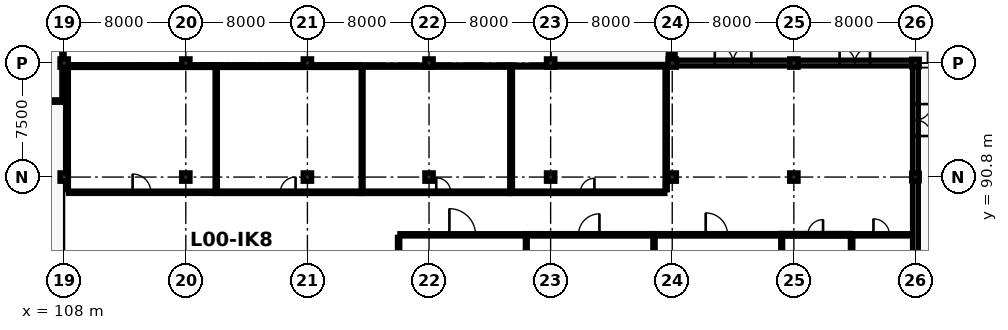
"""IFC4 building model, lengths in metres.
Left out: names, types, materials, properties, quantities, classifications, styles, units other than length and angle.
Written with IfcOpenShell. Run it as: python <this file> out.ifc"""

import sys

from ifc_helpers import new_model, si_unit, direction, frame, frame_2d, origin, origin_2d, place, context, subcontext, project, spatial, rectangle, extrude, element, fill, save


model = new_model("IFC4")
c1 = context("Model", 3, precision=1e-05, world=origin(), true_north=direction((0.0, 1.0)))
c2 = subcontext(c1, "Body", "Model", "MODEL_VIEW")
j1 = project(units=[si_unit("LENGTHUNIT", "METRE"), si_unit("PLANEANGLEUNIT", "RADIAN")], contexts=[c1])
p1 = place(None, origin())
s1 = spatial("IfcSite", under=j1, at=p1, CompositionType="ELEMENT")
p2 = place(p1, origin())
s2 = spatial("IfcBuilding", under=s1, at=p2, CompositionType="ELEMENT")
p3 = place(p2, origin())
s3 = spatial("IfcBuildingStorey", under=s2, at=p3, CompositionType="ELEMENT", Elevation=0.0)
for number, where, z_axis, x_axis in (
    (1, (108.0, 90.8, 0.0), (0.0, 0.0, 1.0), (1.0, 0.0, 0.0)),
    (2, (108.0, 98.3, 0.0), (0.0, 0.0, 1.0), (1.0, 0.0, 0.0)),
    (3, (116.0, 90.8, 0.0), (0.0, 0.0, 1.0), (1.0, 0.0, 0.0)),
    (4, (116.0, 98.3, 0.0), (0.0, 0.0, 1.0), (1.0, 0.0, 0.0)),
    (5, (124.0, 90.8, 0.0), (0.0, 0.0, 1.0), (1.0, 0.0, 0.0)),
    (6, (124.0, 98.3, 0.0), (0.0, 0.0, 1.0), (1.0, 0.0, 0.0)),
    (7, (132.0, 90.8, 0.0), (0.0, 0.0, 1.0), (1.0, 0.0, 0.0)),
    (8, (132.0, 98.3, 0.0), (0.0, 0.0, 1.0), (1.0, 0.0, 0.0)),
    (9, (140.0, 90.8, 0.0), (0.0, 0.0, 1.0), (1.0, 0.0, 0.0)),
    (10, (140.0, 98.3, 0.0), (0.0, 0.0, 1.0), (1.0, 0.0, 0.0)),
    (11, (148.0, 90.8, 0.0), (0.0, 0.0, 1.0), (1.0, 0.0, 0.0)),
    (12, (148.0, 98.3, 0.0), (0.0, 0.0, 1.0), (1.0, 0.0, 0.0)),
    (13, (156.0, 90.8, 0.0), (0.0, 0.0, 1.0), (1.0, 0.0, 0.0)),
    (14, (156.0, 98.3, 0.0), (0.0, 0.0, 1.0), (1.0, 0.0, 0.0)),
):
    element("IfcColumn", number, at=place(p3, frame(where, z_axis=z_axis, x_axis=x_axis)), inside=s3, PredefinedType="COLUMN", context=c2, shape_type="SweptSolid", body=[
        extrude(rectangle(XDim=0.55, YDim=0.55, at=origin_2d()), origin(), (0.0, 0.0, 1.0), 4.7),
    ])
for number, where, z_axis, x_axis in (
    (15, (164.0, 90.8, 0.0), (0.0, 0.0, 1.0), (1.0, 0.0, 0.0)),
    (16, (164.0, 98.3, 0.0), (0.0, 0.0, 1.0), (1.0, 0.0, 0.0)),
):
    element("IfcColumn", number, at=place(p3, frame(where, z_axis=z_axis, x_axis=x_axis)), inside=s3, PredefinedType="COLUMN", context=c2, shape_type="SweptSolid", body=[
        extrude(rectangle(XDim=0.5, YDim=0.5, at=origin_2d()), origin(), (0.0, 0.0, 1.0), 6.226),
    ])
p4 = place(p3, frame((148.0, 105.55, 0.0), z_axis=(0.0, 0.0, 1.0), x_axis=(0.0, -1.0, 0.0)))
e17 = element("IfcWall", 17, at=p4, inside=s3, PredefinedType="SOLIDWALL", context=c2, shape_type="SweptSolid", body=[
    extrude(rectangle(XDim=6.975, YDim=0.38, at=frame_2d((3.488, 0.0))), origin(), (0.0, 0.0, 1.0), 3.985),
])
p5 = place(p4, frame((0.587, 0.0, 0.0)))
e18 = element("IfcOpeningElement", 18, at=p5, cuts=e17, PredefinedType="OPENING", context=c2, shape_type="SweptSolid", body=[
    extrude(rectangle(XDim=5.8, YDim=3.0, at=frame_2d((2.9, 1.5))), frame((0.0, 0.202, 0.0), z_axis=(0.0, -1.0, 0.0), x_axis=(1.0, 0.0, 0.0)), (0.0, 0.0, 1.0), 0.404),
])
p6 = place(p3, frame((148.275, 98.3, 0.0), z_axis=(0.0, 0.0, 1.0), x_axis=(1.0, 0.0, 0.0)))
e19 = element("IfcWall", 19, at=p6, inside=s3, PredefinedType="SOLIDWALL", context=c2, shape_type="SweptSolid", body=[
    extrude(rectangle(XDim=7.45, YDim=0.38, at=frame_2d((3.725, 0.0))), origin(), (0.0, 0.0, 1.0), 3.985),
])
p7 = place(p6, frame((2.525, 0.0, 0.0)))
e20 = element("IfcOpeningElement", 20, at=p7, cuts=e19, PredefinedType="OPENING", context=c2, shape_type="SweptSolid", body=[
    extrude(rectangle(XDim=2.4, YDim=2.55, at=frame_2d((1.2, 1.275))), frame((0.0, 0.202, 0.0), z_axis=(0.0, -1.0, 0.0), x_axis=(1.0, 0.0, 0.0)), (0.0, 0.0, 1.0), 0.404),
])
p8 = place(p3, frame((156.275, 98.3, 0.0), z_axis=(0.0, 0.0, 1.0), x_axis=(1.0, 0.0, 0.0)))
e21 = element("IfcWall", 21, at=p8, inside=s3, PredefinedType="SOLIDWALL", context=c2, shape_type="SweptSolid", body=[
    extrude(rectangle(XDim=7.475, YDim=0.38, at=frame_2d((3.738, 0.0))), origin(), (0.0, 0.0, 1.0), 3.985),
])
p9 = place(p8, frame((2.738, 0.0, 0.0)))
e22 = element("IfcOpeningElement", 22, at=p9, cuts=e21, PredefinedType="OPENING", context=c2, shape_type="SweptSolid", body=[
    extrude(rectangle(XDim=2.0, YDim=2.35, at=frame_2d((1.0, 1.175))), frame((0.0, 0.202, 0.0), z_axis=(0.0, -1.0, 0.0), x_axis=(1.0, 0.0, 0.0)), (0.0, 0.0, 1.0), 0.404),
])
p10 = place(p3, frame((164.0, 98.05, 0.0), z_axis=(0.0, 0.0, 1.0), x_axis=(0.0, -1.0, 0.0)))
e23 = element("IfcWall", 23, at=p10, inside=s3, PredefinedType="SOLIDWALL", context=c2, shape_type="SweptSolid", body=[
    extrude(rectangle(XDim=7.0, YDim=0.38, at=frame_2d((3.5, 0.0))), origin(), (0.0, 0.0, 1.0), 4.67),
])
p11 = place(p10, frame((2.45, 0.0, 0.0)))
e24 = element("IfcOpeningElement", 24, at=p11, cuts=e23, PredefinedType="OPENING", context=c2, shape_type="SweptSolid", body=[
    extrude(rectangle(XDim=2.1, YDim=2.4, at=frame_2d((1.05, 1.2))), frame((0.0, 0.202, 0.0), z_axis=(0.0, -1.0, 0.0), x_axis=(1.0, 0.0, 0.0)), (0.0, 0.0, 1.0), 0.404),
])
p12 = place(p3, frame((164.0, 90.55, 0.0), z_axis=(0.0, 0.0, 1.0), x_axis=(0.0, -1.0, 0.0)))
e25 = element("IfcWall", 25, at=p12, inside=s3, PredefinedType="SOLIDWALL", context=c2, shape_type="SweptSolid", body=[
    extrude(rectangle(XDim=7.0, YDim=0.38, at=frame_2d((3.5, 0.0))), origin(), (0.0, 0.0, 1.0), 4.67),
])
p13 = place(p3, frame((147.87, 98.5, 4.9), z_axis=(0.0, 0.0, 1.0), x_axis=(0.0, 1.0, 0.0)))
e26 = element("IfcWall", 26, at=p13, inside=s3, PredefinedType="PARAPET", context=c2, shape_type="SweptSolid", body=[
    extrude(rectangle(XDim=7.3, YDim=0.26, at=frame_2d((3.65, 0.0))), origin(), (0.0, 0.0, 1.0), 1.15),
])
p14 = place(p3, frame((103.727, 95.8, 0.0), z_axis=(0.0, 0.0, 1.0), x_axis=(1.0, 0.0, 0.0)))
e27 = element("IfcWall", 27, at=p14, inside=s3, PredefinedType="PARTITIONING", context=c2, shape_type="SweptSolid", body=[
    extrude(rectangle(XDim=4.108, YDim=0.16, at=frame_2d((2.054, 0.0))), origin(), (0.0, 0.0, 1.0), 4.035),
])
p15 = place(p14, frame((1.334, 0.0, 0.0)))
e28 = element("IfcOpeningElement", 28, at=p15, cuts=e27, PredefinedType="OPENING", context=c2, shape_type="SweptSolid", body=[
    extrude(rectangle(XDim=1.44, YDim=2.32, at=frame_2d((0.72, 1.16))), frame((0.0, 0.092, 0.0), z_axis=(0.0, -1.0, 0.0), x_axis=(1.0, 0.0, 0.0)), (0.0, 0.0, 1.0), 0.184),
])
p16 = place(p3, frame((130.085, 87.0, 0.0), z_axis=(0.0, 0.0, 1.0), x_axis=(1.0, 0.0, 0.0)))
e29 = element("IfcWall", 29, at=p16, inside=s3, PredefinedType="PARTITIONING", context=c2, shape_type="SweptSolid", body=[
    extrude(rectangle(XDim=8.23, YDim=0.15, at=frame_2d((4.115, 0.0))), origin(), (0.0, 0.0, 1.0), 3.985),
])
p17 = place(p16, frame((3.255, 0.0, 0.0)))
e30 = element("IfcOpeningElement", 30, at=p17, cuts=e29, PredefinedType="OPENING", context=c2, shape_type="SweptSolid", body=[
    extrude(rectangle(XDim=1.72, YDim=2.34, at=frame_2d((0.86, 1.17))), frame((0.0, 0.087, 0.0), z_axis=(0.0, -1.0, 0.0), x_axis=(1.0, 0.0, 0.0)), (0.0, 0.0, 1.0), 0.174),
])
p18 = place(p3, frame((138.327, 87.0, 0.0), z_axis=(0.0, 0.0, 1.0), x_axis=(1.0, 0.0, 0.0)))
e31 = element("IfcWall", 31, at=p18, inside=s3, PredefinedType="PARTITIONING", context=c2, shape_type="SweptSolid", body=[
    extrude(rectangle(XDim=8.388, YDim=0.16, at=frame_2d((4.194, 0.0))), origin(), (0.0, 0.0, 1.0), 3.985),
])
p19 = place(p18, frame((3.504, 0.0, 0.0)))
e32 = element("IfcOpeningElement", 32, at=p19, cuts=e31, PredefinedType="OPENING", context=c2, shape_type="SweptSolid", body=[
    extrude(rectangle(XDim=1.38, YDim=2.3, at=frame_2d((0.69, 1.15))), frame((0.0, 0.092, 0.0), z_axis=(0.0, -1.0, 0.0), x_axis=(1.0, 0.0, 0.0)), (0.0, 0.0, 1.0), 0.184),
])
p20 = place(p3, frame((146.727, 87.0, 0.0), z_axis=(0.0, 0.0, 1.0), x_axis=(1.0, 0.0, 0.0)))
e33 = element("IfcWall", 33, at=p20, inside=s3, PredefinedType="PARTITIONING", context=c2, shape_type="SweptSolid", body=[
    extrude(rectangle(XDim=8.388, YDim=0.16, at=frame_2d((4.194, 0.0))), origin(), (0.0, 0.0, 1.0), 3.985),
])
p21 = place(p20, frame((3.474, 0.0, 0.0)))
e34 = element("IfcOpeningElement", 34, at=p21, cuts=e33, PredefinedType="OPENING", context=c2, shape_type="SweptSolid", body=[
    extrude(rectangle(XDim=1.44, YDim=2.32, at=frame_2d((0.72, 1.16))), frame((0.0, 0.092, 0.0), z_axis=(0.0, -1.0, 0.0), x_axis=(1.0, 0.0, 0.0)), (0.0, 0.0, 1.0), 0.184),
])
p22 = place(p3, frame((155.127, 87.0, 0.0), z_axis=(0.0, 0.0, 1.0), x_axis=(1.0, 0.0, 0.0)))
e35 = element("IfcWall", 35, at=p22, inside=s3, PredefinedType="PARTITIONING", context=c2, shape_type="SweptSolid", body=[
    extrude(rectangle(XDim=4.588, YDim=0.18, at=frame_2d((2.294, 0.0))), origin(), (0.0, 0.0, 1.0), 4.035),
])
p23 = place(p22, frame((1.794, 0.0, 0.0)))
e36 = element("IfcOpeningElement", 36, at=p23, cuts=e35, PredefinedType="OPENING", context=c2, shape_type="SweptSolid", body=[
    extrude(rectangle(XDim=1.0, YDim=2.15, at=frame_2d((0.5, 1.075))), frame((0.0, 0.102, 0.0), z_axis=(0.0, -1.0, 0.0), x_axis=(1.0, 0.0, 0.0)), (0.0, 0.0, 1.0), 0.204),
])
p24 = place(p3, frame((159.727, 87.0, 0.0), z_axis=(0.0, 0.0, 1.0), x_axis=(1.0, 0.0, 0.0)))
e37 = element("IfcWall", 37, at=p24, inside=s3, PredefinedType="PARTITIONING", context=c2, shape_type="SweptSolid", body=[
    extrude(rectangle(XDim=4.071, YDim=0.15, at=frame_2d((2.036, 0.0))), origin(), (0.0, 0.0, 1.0), 4.67),
])
p25 = place(p24, frame((1.51, 0.0, 0.0)))
e38 = element("IfcOpeningElement", 38, at=p25, cuts=e37, PredefinedType="OPENING", context=c2, shape_type="SweptSolid", body=[
    extrude(rectangle(XDim=1.05, YDim=2.15, at=frame_2d((0.525, 1.075))), frame((0.0, 0.087, 0.0), z_axis=(0.0, -1.0, 0.0), x_axis=(1.0, 0.0, 0.0)), (0.0, 0.0, 1.0), 0.174),
])
p26 = place(p3, frame((108.285, 89.8, 0.0), z_axis=(0.0, 0.0, 1.0), x_axis=(1.0, 0.0, 0.0)))
e39 = element("IfcWall", 39, at=p26, inside=s3, PredefinedType="PARTITIONING", context=c2, shape_type="SweptSolid", body=[
    extrude(rectangle(XDim=9.63, YDim=0.15, at=frame_2d((4.815, 0.0))), origin(), (0.0, 0.0, 1.0), 3.985),
])
p27 = place(p26, frame((4.215, 0.0, 0.0)))
e40 = element("IfcOpeningElement", 40, at=p27, cuts=e39, PredefinedType="OPENING", context=c2, shape_type="SweptSolid", body=[
    extrude(rectangle(XDim=1.2, YDim=2.15, at=frame_2d((0.6, 1.075))), frame((0.0, 0.087, 0.0), z_axis=(0.0, -1.0, 0.0), x_axis=(1.0, 0.0, 0.0)), (0.0, 0.0, 1.0), 0.174),
])
p28 = place(p3, frame((117.927, 89.8, 0.0), z_axis=(0.0, 0.0, 1.0), x_axis=(1.0, 0.0, 0.0)))
e41 = element("IfcWall", 41, at=p28, inside=s3, PredefinedType="PARTITIONING", context=c2, shape_type="SweptSolid", body=[
    extrude(rectangle(XDim=9.588, YDim=0.16, at=frame_2d((4.794, 0.0))), origin(), (0.0, 0.0, 1.0), 3.985),
])
p29 = place(p28, frame((4.294, 0.0, 0.0)))
e42 = element("IfcOpeningElement", 42, at=p29, cuts=e41, PredefinedType="OPENING", context=c2, shape_type="SweptSolid", body=[
    extrude(rectangle(XDim=1.0, YDim=2.22, at=frame_2d((0.5, 1.11))), frame((0.0, 0.092, 0.0), z_axis=(0.0, -1.0, 0.0), x_axis=(1.0, 0.0, 0.0)), (0.0, 0.0, 1.0), 0.184),
])
p30 = place(p3, frame((127.527, 89.8, 0.0), z_axis=(0.0, 0.0, 1.0), x_axis=(1.0, 0.0, 0.0)))
e43 = element("IfcWall", 43, at=p30, inside=s3, PredefinedType="PARTITIONING", context=c2, shape_type="SweptSolid", body=[
    extrude(rectangle(XDim=9.788, YDim=0.16, at=frame_2d((4.894, 0.0))), origin(), (0.0, 0.0, 1.0), 3.985),
])
p31 = place(p30, frame((4.949, 0.0, 0.0)))
e44 = element("IfcOpeningElement", 44, at=p31, cuts=e43, PredefinedType="OPENING", context=c2, shape_type="SweptSolid", body=[
    extrude(rectangle(XDim=0.95, YDim=2.15, at=frame_2d((0.475, 1.075))), frame((0.0, 0.092, 0.0), z_axis=(0.0, -1.0, 0.0), x_axis=(1.0, 0.0, 0.0)), (0.0, 0.0, 1.0), 0.184),
])
p32 = place(p3, frame((137.327, 89.8, 0.0), z_axis=(0.0, 0.0, 1.0), x_axis=(1.0, 0.0, 0.0)))
e45 = element("IfcWall", 45, at=p32, inside=s3, PredefinedType="PARTITIONING", context=c2, shape_type="SweptSolid", body=[
    extrude(rectangle(XDim=10.188, YDim=0.16, at=frame_2d((5.094, 0.0))), origin(), (0.0, 0.0, 1.0), 3.985),
])
p33 = place(p32, frame((4.634, 0.0, 0.0)))
e46 = element("IfcOpeningElement", 46, at=p33, cuts=e45, PredefinedType="OPENING", context=c2, shape_type="SweptSolid", body=[
    extrude(rectangle(XDim=0.92, YDim=2.1, at=frame_2d((0.46, 1.05))), frame((0.0, 0.092, 0.0), z_axis=(0.0, -1.0, 0.0), x_axis=(1.0, 0.0, 0.0)), (0.0, 0.0, 1.0), 0.184),
])
p34 = place(p3, frame((108.287, 98.1, 0.0), z_axis=(0.0, 0.0, 1.0), x_axis=(1.0, 0.0, 0.0)))
e47 = element("IfcWall", 47, at=p34, inside=s3, PredefinedType="PARTITIONING", context=c2, shape_type="SweptSolid", body=[
    extrude(rectangle(XDim=9.628, YDim=0.18, at=frame_2d((4.814, 0.0))), origin(), (0.0, 0.0, 1.0), 3.885),
])
p35 = place(p3, frame((117.927, 98.1, 0.0), z_axis=(0.0, 0.0, 1.0), x_axis=(1.0, 0.0, 0.0)))
e48 = element("IfcWall", 48, at=p35, inside=s3, PredefinedType="PARTITIONING", context=c2, shape_type="SweptSolid", body=[
    extrude(rectangle(XDim=9.588, YDim=0.18, at=frame_2d((4.794, 0.0))), origin(), (0.0, 0.0, 1.0), 3.885),
])
p36 = place(p3, frame((127.527, 98.1, 0.0), z_axis=(0.0, 0.0, 1.0), x_axis=(1.0, 0.0, 0.0)))
e49 = element("IfcWall", 49, at=p36, inside=s3, PredefinedType="PARTITIONING", context=c2, shape_type="SweptSolid", body=[
    extrude(rectangle(XDim=9.788, YDim=0.15, at=frame_2d((4.894, 0.0))), origin(), (0.0, 0.0, 1.0), 3.885),
])
p37 = place(p3, frame((137.327, 98.1, 0.0), z_axis=(0.0, 0.0, 1.0), x_axis=(1.0, 0.0, 0.0)))
e50 = element("IfcWall", 50, at=p37, inside=s3, PredefinedType="PARTITIONING", context=c2, shape_type="SweptSolid", body=[
    extrude(rectangle(XDim=10.386, YDim=0.125, at=frame_2d((5.193, 0.0))), origin(), (0.0, 0.0, 1.0), 3.885),
])
p38 = place(p3, frame((107.92, 95.965, 0.0), z_axis=(0.0, 0.0, 1.0), x_axis=(0.0, 1.0, 0.0)))
e51 = element("IfcWall", 51, at=p38, inside=s3, PredefinedType="PARTITIONING", context=c2, shape_type="SweptSolid", body=[
    extrude(rectangle(XDim=17.073, YDim=0.15, at=frame_2d((8.537, 0.0))), origin(), (0.0, 0.0, 1.0), 3.885),
])
p39 = place(p3, frame((130.0, 75.687, 0.0), z_axis=(0.0, 0.0, 1.0), x_axis=(0.0, 1.0, 0.0)))
e52 = element("IfcWall", 52, at=p39, inside=s3, PredefinedType="PARTITIONING", context=c2, shape_type="SweptSolid", body=[
    extrude(rectangle(XDim=11.148, YDim=0.15, at=frame_2d((5.574, 0.0))), origin(), (0.0, 0.0, 1.0), 3.885),
])
p40 = place(p3, frame((138.4, 76.102, 0.0), z_axis=(0.0, 0.0, 1.0), x_axis=(0.0, 1.0, 0.0)))
e53 = element("IfcWall", 53, at=p40, inside=s3, PredefinedType="PARTITIONING", context=c2, shape_type="SweptSolid", body=[
    extrude(rectangle(XDim=10.806, YDim=0.125, at=frame_2d((5.403, 0.0))), origin(), (0.0, 0.0, 1.0), 3.885),
])
p41 = place(p3, frame((146.8, 76.102, 0.0), z_axis=(0.0, 0.0, 1.0), x_axis=(0.0, 1.0, 0.0)))
e54 = element("IfcWall", 54, at=p41, inside=s3, PredefinedType="PARTITIONING", context=c2, shape_type="SweptSolid", body=[
    extrude(rectangle(XDim=10.806, YDim=0.15, at=frame_2d((5.403, 0.0))), origin(), (0.0, 0.0, 1.0), 3.885),
])
p42 = place(p3, frame((155.2, 75.902, 0.0), z_axis=(0.0, 0.0, 1.0), x_axis=(0.0, 1.0, 0.0)))
e55 = element("IfcWall", 55, at=p42, inside=s3, PredefinedType="PARTITIONING", context=c2, shape_type="SweptSolid", body=[
    extrude(rectangle(XDim=10.996, YDim=0.125, at=frame_2d((5.498, 0.0))), origin(), (0.0, 0.0, 1.0), 3.885),
])
p43 = place(p3, frame((159.8, 75.902, 0.0), z_axis=(0.0, 0.0, 1.0), x_axis=(0.0, 1.0, 0.0)))
e56 = element("IfcWall", 56, at=p43, inside=s3, PredefinedType="PARTITIONING", context=c2, shape_type="SweptSolid", body=[
    extrude(rectangle(XDim=11.011, YDim=0.16, at=frame_2d((5.505, 0.0))), origin(), (0.0, 0.0, 1.0), 4.616),
])
p44 = place(p3, frame((108.2, 89.965, 0.0), z_axis=(0.0, 0.0, 1.0), x_axis=(0.0, 1.0, 0.0)))
e57 = element("IfcWall", 57, at=p44, inside=s3, PredefinedType="PARTITIONING", context=c2, shape_type="SweptSolid", body=[
    extrude(rectangle(XDim=8.048, YDim=0.15, at=frame_2d((4.024, 0.0))), origin(), (0.0, 0.0, 1.0), 3.885),
])
p45 = place(p3, frame((118.0, 89.892, 0.0), z_axis=(0.0, 0.0, 1.0), x_axis=(0.0, 1.0, 0.0)))
e58 = element("IfcWall", 58, at=p45, inside=s3, PredefinedType="PARTITIONING", context=c2, shape_type="SweptSolid", body=[
    extrude(rectangle(XDim=8.106, YDim=0.15, at=frame_2d((4.053, 0.0))), origin(), (0.0, 0.0, 1.0), 3.885),
])
p46 = place(p3, frame((127.6, 89.892, 0.0), z_axis=(0.0, 0.0, 1.0), x_axis=(0.0, 1.0, 0.0)))
e59 = element("IfcWall", 59, at=p46, inside=s3, PredefinedType="PARTITIONING", context=c2, shape_type="SweptSolid", body=[
    extrude(rectangle(XDim=8.121, YDim=0.125, at=frame_2d((4.061, 0.0))), origin(), (0.0, 0.0, 1.0), 3.885),
])
p47 = place(p3, frame((137.4, 89.892, 0.0), z_axis=(0.0, 0.0, 1.0), x_axis=(0.0, 1.0, 0.0)))
e60 = element("IfcWall", 60, at=p47, inside=s3, PredefinedType="PARTITIONING", context=c2, shape_type="SweptSolid", body=[
    extrude(rectangle(XDim=8.133, YDim=0.18, at=frame_2d((4.067, 0.0))), origin(), (0.0, 0.0, 1.0), 3.885),
])
p48 = place(p3, frame((147.6, 89.965, 0.0), z_axis=(0.0, 0.0, 1.0), x_axis=(0.0, 1.0, 0.0)))
e61 = element("IfcWall", 61, at=p48, inside=s3, PredefinedType="PARTITIONING", context=c2, shape_type="SweptSolid", body=[
    extrude(rectangle(XDim=8.06, YDim=0.15, at=frame_2d((4.03, 0.0))), origin(), (0.0, 0.0, 1.0), 3.885),
])
p49 = place(p7, origin())
e62 = element("IfcDoor", 62, at=p49, inside=s3, OperationType="DOUBLE_DOOR_SINGLE_SWING", PredefinedType="DOOR", context=c2, shape_type="SweptSolid", body=[
    extrude(rectangle(XDim=2.4, YDim=2.55, at=frame_2d((1.2, 1.275))), frame((0.0, 0.025, 0.0), z_axis=(0.0, -1.0, 0.0), x_axis=(1.0, 0.0, 0.0)), (0.0, 0.0, 1.0), 0.05),
])
fill(e20, e62)
p50 = place(p9, origin())
e63 = element("IfcDoor", 63, at=p50, inside=s3, OperationType="DOUBLE_DOOR_SINGLE_SWING", PredefinedType="DOOR", context=c2, shape_type="SweptSolid", body=[
    extrude(rectangle(XDim=2.0, YDim=2.35, at=frame_2d((1.0, 1.175))), frame((0.0, 0.025, 0.0), z_axis=(0.0, -1.0, 0.0), x_axis=(1.0, 0.0, 0.0)), (0.0, 0.0, 1.0), 0.05),
])
fill(e22, e63)
p51 = place(p11, origin())
e64 = element("IfcDoor", 64, at=p51, inside=s3, OperationType="DOUBLE_DOOR_SINGLE_SWING", PredefinedType="DOOR", context=c2, shape_type="SweptSolid", body=[
    extrude(rectangle(XDim=2.1, YDim=2.4, at=frame_2d((1.05, 1.2))), frame((0.0, 0.025, 0.0), z_axis=(0.0, -1.0, 0.0), x_axis=(1.0, 0.0, 0.0)), (0.0, 0.0, 1.0), 0.05),
])
fill(e24, e64)
p52 = place(p17, origin())
e65 = element("IfcDoor", 65, at=p52, inside=s3, OperationType="SINGLE_SWING_LEFT", PredefinedType="DOOR", context=c2, shape_type="SweptSolid", body=[
    extrude(rectangle(XDim=1.72, YDim=2.34, at=frame_2d((0.86, 1.17))), frame((0.0, 0.025, 0.0), z_axis=(0.0, -1.0, 0.0), x_axis=(1.0, 0.0, 0.0)), (0.0, 0.0, 1.0), 0.05),
])
fill(e30, e65)
p53 = place(p19, origin())
e66 = element("IfcDoor", 66, at=p53, inside=s3, OperationType="SINGLE_SWING_RIGHT", PredefinedType="DOOR", context=c2, shape_type="SweptSolid", body=[
    extrude(rectangle(XDim=1.38, YDim=2.3, at=frame_2d((0.69, 1.15))), frame((0.0, 0.025, 0.0), z_axis=(0.0, -1.0, 0.0), x_axis=(1.0, 0.0, 0.0)), (0.0, 0.0, 1.0), 0.05),
])
fill(e32, e66)
p54 = place(p21, origin())
e67 = element("IfcDoor", 67, at=p54, inside=s3, OperationType="SINGLE_SWING_LEFT", PredefinedType="DOOR", context=c2, shape_type="SweptSolid", body=[
    extrude(rectangle(XDim=1.44, YDim=2.32, at=frame_2d((0.72, 1.16))), frame((0.0, 0.025, 0.0), z_axis=(0.0, -1.0, 0.0), x_axis=(1.0, 0.0, 0.0)), (0.0, 0.0, 1.0), 0.05),
])
fill(e34, e67)
p55 = place(p23, origin())
e68 = element("IfcDoor", 68, at=p55, inside=s3, OperationType="SINGLE_SWING_RIGHT", PredefinedType="DOOR", context=c2, shape_type="SweptSolid", body=[
    extrude(rectangle(XDim=1.0, YDim=2.15, at=frame_2d((0.5, 1.075))), frame((0.0, 0.025, 0.0), z_axis=(0.0, -1.0, 0.0), x_axis=(1.0, 0.0, 0.0)), (0.0, 0.0, 1.0), 0.05),
])
fill(e36, e68)
p56 = place(p25, origin())
e69 = element("IfcDoor", 69, at=p56, inside=s3, OperationType="SINGLE_SWING_LEFT", PredefinedType="DOOR", context=c2, shape_type="SweptSolid", body=[
    extrude(rectangle(XDim=1.05, YDim=2.15, at=frame_2d((0.525, 1.075))), frame((0.0, 0.025, 0.0), z_axis=(0.0, -1.0, 0.0), x_axis=(1.0, 0.0, 0.0)), (0.0, 0.0, 1.0), 0.05),
])
fill(e38, e69)
p57 = place(p27, origin())
e70 = element("IfcDoor", 70, at=p57, inside=s3, OperationType="SINGLE_SWING_LEFT", PredefinedType="DOOR", context=c2, shape_type="SweptSolid", body=[
    extrude(rectangle(XDim=1.2, YDim=2.15, at=frame_2d((0.6, 1.075))), frame((0.0, 0.025, 0.0), z_axis=(0.0, -1.0, 0.0), x_axis=(1.0, 0.0, 0.0)), (0.0, 0.0, 1.0), 0.05),
])
fill(e40, e70)
p58 = place(p29, origin())
e71 = element("IfcDoor", 71, at=p58, inside=s3, OperationType="SINGLE_SWING_RIGHT", PredefinedType="DOOR", context=c2, shape_type="SweptSolid", body=[
    extrude(rectangle(XDim=1.0, YDim=2.22, at=frame_2d((0.5, 1.11))), frame((0.0, 0.025, 0.0), z_axis=(0.0, -1.0, 0.0), x_axis=(1.0, 0.0, 0.0)), (0.0, 0.0, 1.0), 0.05),
])
fill(e42, e71)
p59 = place(p31, origin())
e72 = element("IfcDoor", 72, at=p59, inside=s3, OperationType="SINGLE_SWING_LEFT", PredefinedType="DOOR", context=c2, shape_type="SweptSolid", body=[
    extrude(rectangle(XDim=0.95, YDim=2.15, at=frame_2d((0.475, 1.075))), frame((0.0, 0.025, 0.0), z_axis=(0.0, -1.0, 0.0), x_axis=(1.0, 0.0, 0.0)), (0.0, 0.0, 1.0), 0.05),
])
fill(e44, e72)
p60 = place(p33, origin())
e73 = element("IfcDoor", 73, at=p60, inside=s3, OperationType="SINGLE_SWING_RIGHT", PredefinedType="DOOR", context=c2, shape_type="SweptSolid", body=[
    extrude(rectangle(XDim=0.92, YDim=2.1, at=frame_2d((0.46, 1.05))), frame((0.0, 0.025, 0.0), z_axis=(0.0, -1.0, 0.0), x_axis=(1.0, 0.0, 0.0)), (0.0, 0.0, 1.0), 0.05),
])
fill(e46, e73)
save(model, sys.argv[1])
